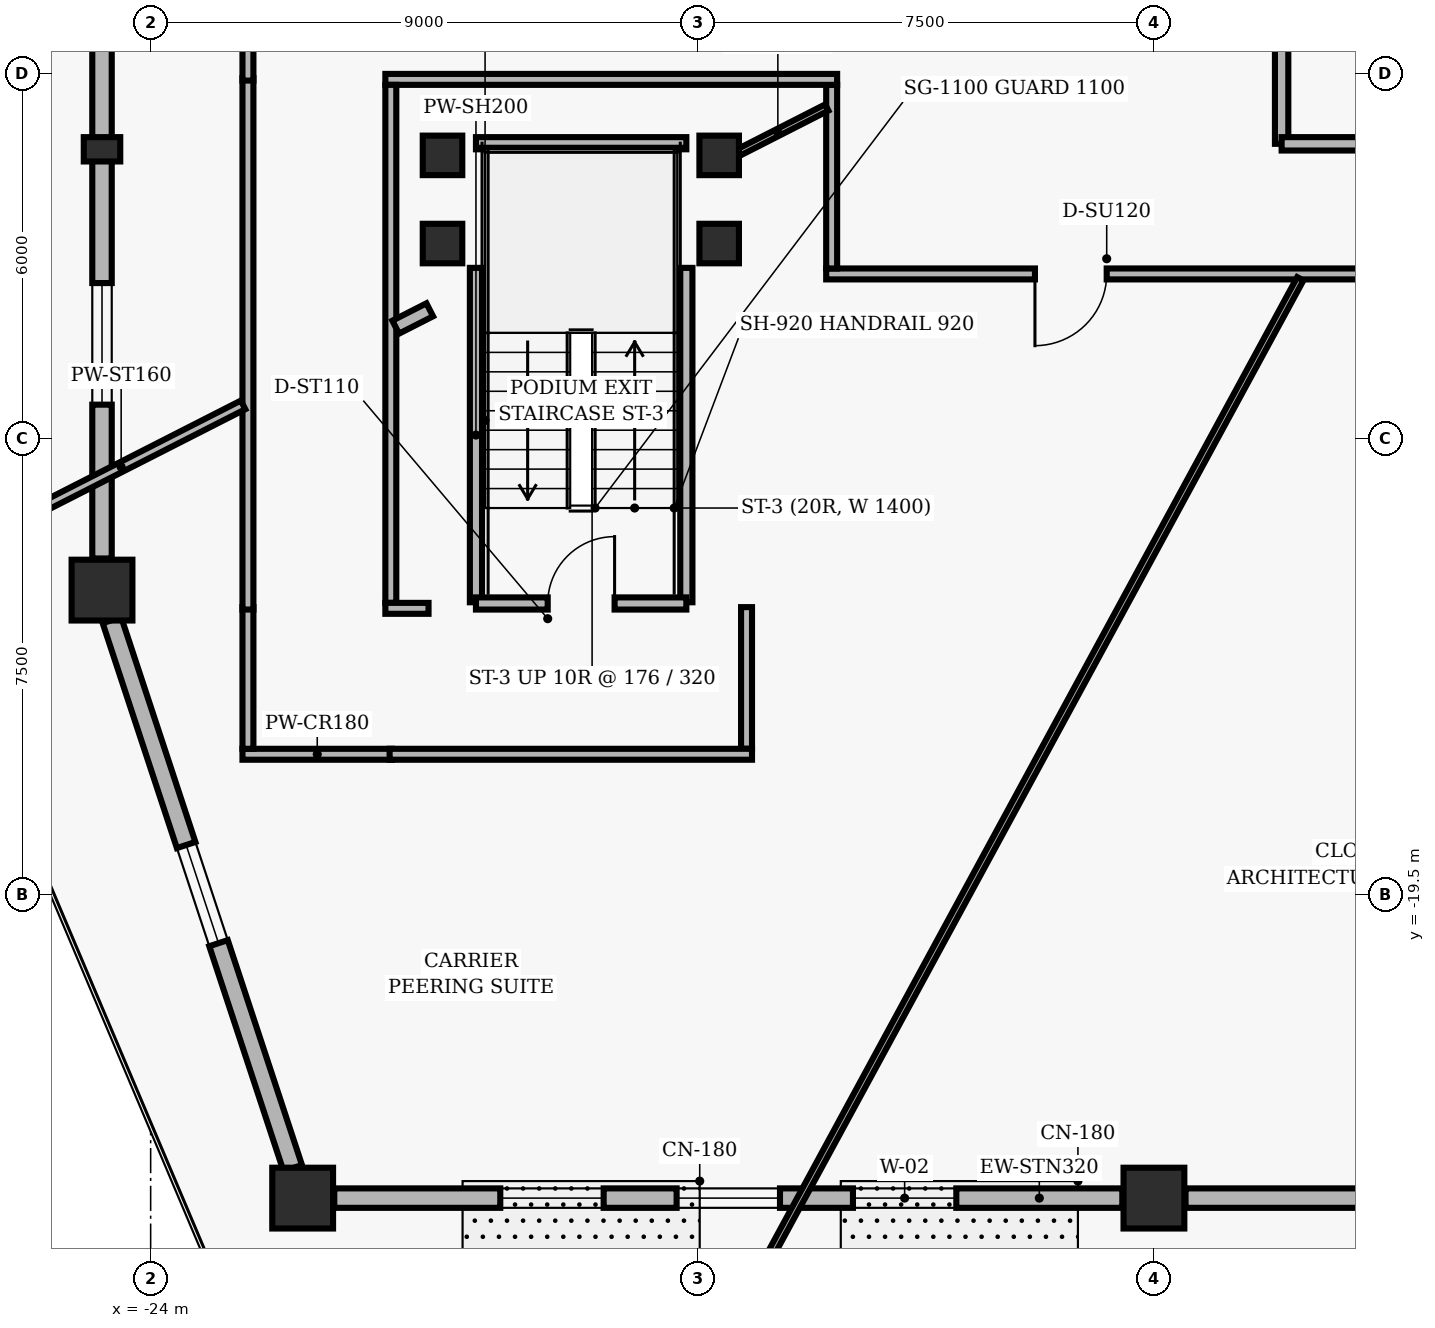
"""IFC4 building model, lengths in metres.
Left out: names, types, materials, properties, quantities, classifications, styles, units other than length and angle.
Written with IfcOpenShell. Run it as: python <this file> out.ifc"""

import sys

from ifc_helpers import new_model, si_unit, direction, frame, frame_2d, origin, origin_2d, place, context, subcontext, project, spatial, rectangle, extrude, element, fill, save


model = new_model("IFC4")
c1 = context("Model", 3, precision=1e-05, world=origin(), true_north=direction((0.0, 1.0)))
c2 = subcontext(c1, "Body", "Model", "MODEL_VIEW")
j1 = project(units=[si_unit("LENGTHUNIT", "METRE"), si_unit("PLANEANGLEUNIT", "RADIAN")], contexts=[c1])
p1 = place(None, origin())
s1 = spatial("IfcSite", under=j1, at=p1, CompositionType="ELEMENT")
p2 = place(p1, origin())
s2 = spatial("IfcBuilding", under=s1, at=p2, CompositionType="ELEMENT")
p3 = place(p2, frame((0.0, 0.0, 4.8)))
s3 = spatial("IfcBuildingStorey", under=s2, at=p3, CompositionType="ELEMENT", Elevation=4.8)
for number, where, z_axis, x_axis in (
    (1, (-21.5, -24.5, 0.0), (0.0, 0.0, 1.0), (1.0, 0.0, 0.0)),
    (2, (-7.5, -24.5, 0.0), (0.0, 0.0, 1.0), (1.0, 0.0, 0.0)),
    (3, (-24.8, -14.5, 0.0), (0.0, 0.0, 1.0), (1.0, 0.0, 0.0)),
):
    element("IfcColumn", number, at=place(p3, frame(where, z_axis=z_axis, x_axis=x_axis)), inside=s3, PredefinedType="COLUMN", context=c2, shape_type="SweptSolid", body=[
        extrude(rectangle(XDim=1.0, YDim=1.0, at=origin_2d()), origin(), (0.0, 0.0, 1.0), 3.52),
    ])
for number, where, z_axis, x_axis in (
    (4, (-19.2, -8.8, 0.0), (0.0, 0.0, 1.0), (1.0, 0.0, 0.0)),
    (5, (-14.65, -8.8, 0.0), (0.0, 0.0, 1.0), (1.0, 0.0, 0.0)),
    (6, (-19.2, -7.35, 0.0), (0.0, 0.0, 1.0), (1.0, 0.0, 0.0)),
    (7, (-14.65, -7.35, 0.0), (0.0, 0.0, 1.0), (1.0, 0.0, 0.0)),
):
    element("IfcColumn", number, at=place(p3, frame(where, z_axis=z_axis, x_axis=x_axis)), inside=s3, PredefinedType="COLUMN", context=c2, shape_type="SweptSolid", body=[
        extrude(rectangle(XDim=0.65, YDim=0.65, at=origin_2d()), origin(), (0.0, 0.0, 1.0), 3.52),
    ])
p4 = place(p3, frame((-24.8, -7.25, 0.0), z_axis=(0.0, 0.0, 1.0), x_axis=(1.0, 0.0, 0.0)))
e8 = element("IfcColumn", 8, at=p4, inside=s3, PredefinedType="PILASTER", context=c2, shape_type="SweptSolid", body=[
    extrude(rectangle(XDim=0.6, YDim=0.4, at=origin_2d()), origin(), (0.0, 0.0, 1.0), 3.52),
])
p5 = place(p3, frame((-8.02, -24.5, 0.0), z_axis=(0.0, 0.0, 1.0), x_axis=(-1.0, 0.0, 0.0)))
e9 = element("IfcWall", 9, at=p5, inside=s3, PredefinedType="SOLIDWALL", context=c2, shape_type="SweptSolid", body=[
    extrude(rectangle(XDim=12.96, YDim=0.32, at=frame_2d((6.48, 0.0))), origin(), (0.0, 0.0, 1.0), 2.588),
])
p6 = place(p5, frame((2.73, 0.0, 0.65)))
e10 = element("IfcOpeningElement", 10, at=p6, cuts=e9, PredefinedType="OPENING", context=c2, shape_type="SweptSolid", body=[
    extrude(rectangle(XDim=1.7, YDim=1.5, at=frame_2d((0.85, 0.75))), frame((0.0, 0.17, 0.0), z_axis=(0.0, -1.0, 0.0), x_axis=(1.0, 0.0, 0.0)), (0.0, 0.0, 1.0), 0.34),
])
p7 = place(p5, frame((5.63, 0.0, 0.65)))
e11 = element("IfcOpeningElement", 11, at=p7, cuts=e9, PredefinedType="OPENING", context=c2, shape_type="SweptSolid", body=[
    extrude(rectangle(XDim=1.7, YDim=1.5, at=frame_2d((0.85, 0.75))), frame((0.0, 0.17, 0.0), z_axis=(0.0, -1.0, 0.0), x_axis=(1.0, 0.0, 0.0)), (0.0, 0.0, 1.0), 0.34),
])
p8 = place(p5, frame((8.53, 0.0, 0.65)))
e12 = element("IfcOpeningElement", 12, at=p8, cuts=e9, PredefinedType="OPENING", context=c2, shape_type="SweptSolid", body=[
    extrude(rectangle(XDim=1.7, YDim=1.5, at=frame_2d((0.85, 0.75))), frame((0.0, 0.17, 0.0), z_axis=(0.0, -1.0, 0.0), x_axis=(1.0, 0.0, 0.0)), (0.0, 0.0, 1.0), 0.34),
])
p9 = place(p3, frame((4.98, -24.5, 0.0), z_axis=(0.0, 0.0, 1.0), x_axis=(-1.0, 0.0, 0.0)))
e13 = element("IfcWall", 13, at=p9, inside=s3, PredefinedType="SOLIDWALL", context=c2, shape_type="SweptSolid", body=[
    extrude(rectangle(XDim=11.96, YDim=0.32, at=frame_2d((5.98, 0.0))), origin(), (0.0, 0.0, 1.0), 2.588),
])
p10 = place(p9, frame((2.98, 0.0, 0.65)))
e14 = element("IfcOpeningElement", 14, at=p10, cuts=e13, PredefinedType="OPENING", context=c2, shape_type="SweptSolid", body=[
    extrude(rectangle(XDim=1.2, YDim=1.6, at=frame_2d((0.6, 0.8))), frame((0.0, 0.17, 0.0), z_axis=(0.0, -1.0, 0.0), x_axis=(1.0, 0.0, 0.0)), (0.0, 0.0, 1.0), 0.34),
])
p11 = place(p9, frame((5.38, 0.0, 0.65)))
e15 = element("IfcOpeningElement", 15, at=p11, cuts=e13, PredefinedType="OPENING", context=c2, shape_type="SweptSolid", body=[
    extrude(rectangle(XDim=1.2, YDim=1.6, at=frame_2d((0.6, 0.8))), frame((0.0, 0.17, 0.0), z_axis=(0.0, -1.0, 0.0), x_axis=(1.0, 0.0, 0.0)), (0.0, 0.0, 1.0), 0.34),
])
p12 = place(p9, frame((7.78, 0.0, 0.65)))
e16 = element("IfcOpeningElement", 16, at=p12, cuts=e13, PredefinedType="OPENING", context=c2, shape_type="SweptSolid", body=[
    extrude(rectangle(XDim=1.2, YDim=1.6, at=frame_2d((0.6, 0.8))), frame((0.0, 0.17, 0.0), z_axis=(0.0, -1.0, 0.0), x_axis=(1.0, 0.0, 0.0)), (0.0, 0.0, 1.0), 0.34),
])
p13 = place(p3, frame((-24.8, -13.98, 0.0), z_axis=(0.0, 0.0, 1.0), x_axis=(0.0, 1.0, 0.0)))
e17 = element("IfcWall", 17, at=p13, inside=s3, PredefinedType="SOLIDWALL", context=c2, shape_type="SweptSolid", body=[
    extrude(rectangle(XDim=13.46, YDim=0.32, at=frame_2d((6.73, 0.0))), origin(), (0.0, 0.0, 1.0), 2.588),
])
p14 = place(p13, frame((2.53, 0.0, 0.65)))
e18 = element("IfcOpeningElement", 18, at=p14, cuts=e17, PredefinedType="OPENING", context=c2, shape_type="SweptSolid", body=[
    extrude(rectangle(XDim=2.0, YDim=1.6, at=frame_2d((1.0, 0.8))), frame((0.0, 0.17, 0.0), z_axis=(0.0, -1.0, 0.0), x_axis=(1.0, 0.0, 0.0)), (0.0, 0.0, 1.0), 0.34),
])
p15 = place(p13, frame((8.93, 0.0, 0.65)))
e19 = element("IfcOpeningElement", 19, at=p15, cuts=e17, PredefinedType="OPENING", context=c2, shape_type="SweptSolid", body=[
    extrude(rectangle(XDim=2.0, YDim=1.6, at=frame_2d((1.0, 0.8))), frame((0.0, 0.17, 0.0), z_axis=(0.0, -1.0, 0.0), x_axis=(1.0, 0.0, 0.0)), (0.0, 0.0, 1.0), 0.34),
])
p16 = place(p3, frame((-21.663, -24.006, 0.0), z_axis=(0.0, 0.0, 1.0), x_axis=(-0.313363070681, 0.949633395544, 0.0)))
e20 = element("IfcWall", 20, at=p16, inside=s3, PredefinedType="SOLIDWALL", context=c2, shape_type="SweptSolid", body=[
    extrude(rectangle(XDim=9.49, YDim=0.32, at=frame_2d((4.745, 0.0))), origin(), (0.0, 0.0, 1.0), 2.588),
])
p17 = place(p16, frame((3.895, 0.0, 0.65)))
e21 = element("IfcOpeningElement", 21, at=p17, cuts=e20, PredefinedType="OPENING", context=c2, shape_type="SweptSolid", body=[
    extrude(rectangle(XDim=1.7, YDim=1.5, at=frame_2d((0.85, 0.75))), frame((0.0, 0.17, 0.0), z_axis=(0.0, -1.0, 0.0), x_axis=(1.0, 0.0, 0.0)), (0.0, 0.0, 1.0), 0.34),
])
p18 = place(p3, frame((-5.4, -7.16, 0.0), z_axis=(0.0, 0.0, 1.0), x_axis=(0.0, 1.0, 0.0)))
e22 = element("IfcWall", 22, at=p18, inside=s3, PredefinedType="PARTITIONING", context=c2, shape_type="SweptSolid", body=[
    extrude(rectangle(XDim=2.71, YDim=0.22, at=frame_2d((1.355, 0.0))), origin(), (0.0, 0.0, 1.0), 3.193),
])
p19 = place(p3, frame((-5.4, -7.16, 0.0), z_axis=(0.0, 0.0, 1.0), x_axis=(1.0, 0.0, 0.0)))
e23 = element("IfcWall", 23, at=p19, inside=s3, PredefinedType="PARTITIONING", context=c2, shape_type="SweptSolid", body=[
    extrude(rectangle(XDim=5.4, YDim=0.22, at=frame_2d((2.7, 0.0))), origin(), (0.0, 0.0, 1.0), 3.193),
])
p20 = place(p19, frame((2.05, 0.0, 0.0)))
e24 = element("IfcOpeningElement", 24, at=p20, cuts=e23, PredefinedType="OPENING", context=c2, shape_type="SweptSolid", body=[
    extrude(rectangle(XDim=1.12, YDim=2.02, at=frame_2d((0.56, 1.01))), frame((0.0, 0.12, 0.0), z_axis=(0.0, -1.0, 0.0), x_axis=(1.0, 0.0, 0.0)), (0.0, 0.0, 1.0), 0.24),
])
for number, where, z_axis, x_axis in (
    (25, (-18.65, -14.7, 0.0), (0.0, 0.0, 1.0), (0.0, 1.0, 0.0)),
    (26, (-15.19, -14.7, 0.0), (0.0, 0.0, 1.0), (0.0, 1.0, 0.0)),
):
    element("IfcWall", number, at=place(p3, frame(where, z_axis=z_axis, x_axis=x_axis)), inside=s3, PredefinedType="PARTITIONING", context=c2, shape_type="SweptSolid", body=[
        extrude(rectangle(XDim=5.5, YDim=0.2, at=frame_2d((2.75, 0.0))), origin(), (0.0, 0.0, 1.0), 3.193),
    ])
p21 = place(p3, frame((-18.65, -7.15, 0.0), z_axis=(0.0, 0.0, 1.0), x_axis=(1.0, 0.0, 0.0)))
e27 = element("IfcWall", 27, at=p21, inside=s3, PredefinedType="PARTITIONING", context=c2, shape_type="SweptSolid", body=[
    extrude(rectangle(XDim=3.46, YDim=0.2, at=frame_2d((1.73, 0.0))), origin(), (0.0, 0.0, 1.0), 1.3),
])
p22 = place(p3, frame((-18.65, -14.72, 0.0), z_axis=(0.0, 0.0, 1.0), x_axis=(1.0, 0.0, 0.0)))
e28 = element("IfcWall", 28, at=p22, inside=s3, PredefinedType="PARTITIONING", context=c2, shape_type="SweptSolid", body=[
    extrude(rectangle(XDim=3.46, YDim=0.2, at=frame_2d((1.73, 0.0))), origin(), (0.0, 0.0, 1.0), 3.193),
])
p23 = place(p22, frame((1.18, 0.0, 0.0)))
e29 = element("IfcOpeningElement", 29, at=p23, cuts=e28, PredefinedType="OPENING", context=c2, shape_type="SweptSolid", body=[
    extrude(rectangle(XDim=1.1, YDim=2.04, at=frame_2d((0.55, 1.02))), frame((0.0, 0.11, 0.0), z_axis=(0.0, -1.0, 0.0), x_axis=(1.0, 0.0, 0.0)), (0.0, 0.0, 1.0), 0.22),
])
p24 = place(p3, frame((-20.03, -17.2, 0.0), z_axis=(0.0, 0.0, 1.0), x_axis=(-1.0, 0.0, 0.0)))
e30 = element("IfcWall", 30, at=p24, inside=s3, PredefinedType="PARTITIONING", context=c2, shape_type="SweptSolid", body=[
    extrude(rectangle(XDim=2.46, YDim=0.18, at=frame_2d((1.23, 0.0))), origin(), (0.0, 0.0, 1.0), 3.193),
])
p25 = place(p3, frame((-22.4, -17.11, 0.0), z_axis=(0.0, 0.0, 1.0), x_axis=(0.0, 1.0, 0.0)))
e31 = element("IfcWall", 31, at=p25, inside=s3, PredefinedType="PARTITIONING", context=c2, shape_type="SweptSolid", body=[
    extrude(rectangle(XDim=2.33, YDim=0.18, at=frame_2d((1.165, 0.0))), origin(), (0.0, 0.0, 1.0), 3.193),
])
p26 = place(p3, frame((-22.4, -14.82, 0.0), z_axis=(0.0, 0.0, 1.0), x_axis=(0.0, 1.0, 0.0)))
e32 = element("IfcWall", 32, at=p26, inside=s3, PredefinedType="PARTITIONING", context=c2, shape_type="SweptSolid", body=[
    extrude(rectangle(XDim=8.74, YDim=0.18, at=frame_2d((4.37, 0.0))), origin(), (0.0, 0.0, 1.0), 3.193),
])
p27 = place(p3, frame((-22.4, -6.12, 0.0), z_axis=(0.0, 0.0, 1.0), x_axis=(0.0, 1.0, 0.0)))
e33 = element("IfcWall", 33, at=p27, inside=s3, PredefinedType="PARTITIONING", context=c2, shape_type="SweptSolid", body=[
    extrude(rectangle(XDim=2.33, YDim=0.18, at=frame_2d((1.165, 0.0))), origin(), (0.0, 0.0, 1.0), 3.193),
])
p28 = place(p3, frame((12.89, -9.3, 0.0), z_axis=(0.0, 0.0, 1.0), x_axis=(-1.0, 0.0, 0.0)))
e34 = element("IfcWall", 34, at=p28, inside=s3, PredefinedType="PARTITIONING", context=c2, shape_type="SweptSolid", body=[
    extrude(rectangle(XDim=25.78, YDim=0.18, at=frame_2d((12.89, 0.0))), origin(), (0.0, 0.0, 1.0), 2.76),
])
p29 = place(p28, frame((21.167, 0.0, 0.0)))
e35 = element("IfcOpeningElement", 35, at=p29, cuts=e34, PredefinedType="OPENING", context=c2, shape_type="SweptSolid", body=[
    extrude(rectangle(XDim=1.18, YDim=2.02, at=frame_2d((0.59, 1.01))), frame((0.0, 0.1, 0.0), z_axis=(0.0, -1.0, 0.0), x_axis=(1.0, 0.0, 0.0)), (0.0, 0.0, 1.0), 0.2),
])
p30 = place(p28, frame((14.507, 0.0, 0.0)))
e36 = element("IfcOpeningElement", 36, at=p30, cuts=e34, PredefinedType="OPENING", context=c2, shape_type="SweptSolid", body=[
    extrude(rectangle(XDim=0.96, YDim=2.02, at=frame_2d((0.48, 1.01))), frame((0.0, 0.1, 0.0), z_axis=(0.0, -1.0, 0.0), x_axis=(1.0, 0.0, 0.0)), (0.0, 0.0, 1.0), 0.2),
])
p31 = place(p28, frame((8.119, 0.0, 0.0)))
e37 = element("IfcOpeningElement", 37, at=p31, cuts=e34, PredefinedType="OPENING", context=c2, shape_type="SweptSolid", body=[
    extrude(rectangle(XDim=1.02, YDim=2.02, at=frame_2d((0.51, 1.01))), frame((0.0, 0.1, 0.0), z_axis=(0.0, -1.0, 0.0), x_axis=(1.0, 0.0, 0.0)), (0.0, 0.0, 1.0), 0.2),
])
p32 = place(p3, frame((-12.8, -9.21, 0.0), z_axis=(0.0, 0.0, 1.0), x_axis=(0.0, 1.0, 0.0)))
e38 = element("IfcWall", 38, at=p32, inside=s3, PredefinedType="PARTITIONING", context=c2, shape_type="SweptSolid", body=[
    extrude(rectangle(XDim=3.02, YDim=0.18, at=frame_2d((1.51, 0.0))), origin(), (0.0, 0.0, 1.0), 3.193),
])
p33 = place(p3, frame((-12.71, -6.1, 0.0), z_axis=(0.0, 0.0, 1.0), x_axis=(-1.0, 0.0, 0.0)))
e39 = element("IfcWall", 39, at=p33, inside=s3, PredefinedType="PARTITIONING", context=c2, shape_type="SweptSolid", body=[
    extrude(rectangle(XDim=7.43, YDim=0.18, at=frame_2d((3.715, 0.0))), origin(), (0.0, 0.0, 1.0), 3.193),
])
p34 = place(p3, frame((-20.05, -6.19, 0.0), z_axis=(0.0, 0.0, 1.0), x_axis=(0.0, -1.0, 0.0)))
e40 = element("IfcWall", 40, at=p34, inside=s3, PredefinedType="PARTITIONING", context=c2, shape_type="SweptSolid", body=[
    extrude(rectangle(XDim=8.52, YDim=0.18, at=frame_2d((4.26, 0.0))), origin(), (0.0, 0.0, 1.0), 2.246),
])
p35 = place(p3, frame((-20.14, -14.8, 0.0), z_axis=(0.0, 0.0, 1.0), x_axis=(1.0, 0.0, 0.0)))
e41 = element("IfcWall", 41, at=p35, inside=s3, PredefinedType="PARTITIONING", context=c2, shape_type="SweptSolid", body=[
    extrude(rectangle(XDim=0.71, YDim=0.18, at=frame_2d((0.355, 0.0))), origin(), (0.0, 0.0, 1.0), 3.193),
])
p36 = place(p3, frame((-14.2, -14.78, 0.0), z_axis=(0.0, 0.0, 1.0), x_axis=(0.0, -1.0, 0.0)))
e42 = element("IfcWall", 42, at=p36, inside=s3, PredefinedType="PARTITIONING", context=c2, shape_type="SweptSolid", body=[
    extrude(rectangle(XDim=2.33, YDim=0.18, at=frame_2d((1.165, 0.0))), origin(), (0.0, 0.0, 1.0), 3.193),
])
p37 = place(p3, frame((-14.11, -17.2, 0.0), z_axis=(0.0, 0.0, 1.0), x_axis=(-1.0, 0.0, 0.0)))
e43 = element("IfcWall", 43, at=p37, inside=s3, PredefinedType="PARTITIONING", context=c2, shape_type="SweptSolid", body=[
    extrude(rectangle(XDim=5.96, YDim=0.18, at=frame_2d((2.98, 0.0))), origin(), (0.0, 0.0, 1.0), 3.193),
])
p38 = place(p3, frame((-12.88, -6.563, 0.0), z_axis=(0.0, 0.0, 1.0), x_axis=(-0.891024030563, -0.453956139908, 0.0)))
e44 = element("IfcWall", 44, at=p38, inside=s3, PredefinedType="MOVABLE", context=c2, shape_type="SweptSolid", body=[
    extrude(rectangle(XDim=1.807, YDim=0.115, at=frame_2d((0.904, 0.0))), origin(), (0.0, 0.0, 1.0), 3.193),
])
p39 = place(p3, frame((-19.41, -9.89, 0.0), z_axis=(0.0, 0.0, 1.0), x_axis=(-0.890983173506, -0.454036325121, 0.0)))
e45 = element("IfcWall", 45, at=p39, inside=s3, PredefinedType="PARTITIONING", context=c2, shape_type="SweptSolid", body=[
    extrude(rectangle(XDim=0.629, YDim=0.24, at=frame_2d((0.314, 0.0))), origin(), (0.0, 0.0, 1.0), 3.193),
])
p40 = place(p3, frame((-22.48, -11.454, 0.0), z_axis=(0.0, 0.0, 1.0), x_axis=(-0.891005547882, -0.453992415843, 0.0)))
e46 = element("IfcWall", 46, at=p40, inside=s3, PredefinedType="PARTITIONING", context=c2, shape_type="SweptSolid", body=[
    extrude(rectangle(XDim=4.5, YDim=0.16, at=frame_2d((2.25, 0.0))), origin(), (0.0, 0.0, 1.0), 3.193),
])
p41 = place(p3, frame((-5.093, -9.38, 0.0), z_axis=(0.0, 0.0, 1.0), x_axis=(-0.477152799659, -0.878820348978, 0.0)))
e47 = element("IfcWall", 47, at=p41, inside=s3, PredefinedType="MOVABLE", context=c2, shape_type="SweptSolid", body=[
    extrude(rectangle(XDim=19.981, YDim=0.115, at=frame_2d((9.991, 0.0))), origin(), (0.0, 0.0, 1.0), 3.193),
])
p42 = place(p6, origin())
e48 = element("IfcWindow", 48, at=p42, inside=s3, PartitioningType="SINGLE_PANEL", PredefinedType="WINDOW", context=c2, shape_type="SweptSolid", body=[
    extrude(rectangle(XDim=1.7, YDim=1.5, at=frame_2d((0.85, 0.75))), frame((0.0, 0.03, 0.0), z_axis=(0.0, -1.0, 0.0), x_axis=(1.0, 0.0, 0.0)), (0.0, 0.0, 1.0), 0.06),
])
fill(e10, e48)
p43 = place(p7, origin())
e49 = element("IfcWindow", 49, at=p43, inside=s3, PartitioningType="SINGLE_PANEL", PredefinedType="WINDOW", context=c2, shape_type="SweptSolid", body=[
    extrude(rectangle(XDim=1.7, YDim=1.5, at=frame_2d((0.85, 0.75))), frame((0.0, 0.03, 0.0), z_axis=(0.0, -1.0, 0.0), x_axis=(1.0, 0.0, 0.0)), (0.0, 0.0, 1.0), 0.06),
])
fill(e11, e49)
p44 = place(p8, origin())
e50 = element("IfcWindow", 50, at=p44, inside=s3, PartitioningType="SINGLE_PANEL", PredefinedType="WINDOW", context=c2, shape_type="SweptSolid", body=[
    extrude(rectangle(XDim=1.7, YDim=1.5, at=frame_2d((0.85, 0.75))), frame((0.0, 0.03, 0.0), z_axis=(0.0, -1.0, 0.0), x_axis=(1.0, 0.0, 0.0)), (0.0, 0.0, 1.0), 0.06),
])
fill(e12, e50)
p45 = place(p14, origin())
e51 = element("IfcWindow", 51, at=p45, inside=s3, PartitioningType="SINGLE_PANEL", PredefinedType="WINDOW", context=c2, shape_type="SweptSolid", body=[
    extrude(rectangle(XDim=2.0, YDim=1.6, at=frame_2d((1.0, 0.8))), frame((0.0, 0.03, 0.0), z_axis=(0.0, -1.0, 0.0), x_axis=(1.0, 0.0, 0.0)), (0.0, 0.0, 1.0), 0.06),
])
fill(e18, e51)
p46 = place(p17, origin())
e52 = element("IfcWindow", 52, at=p46, inside=s3, PartitioningType="SINGLE_PANEL", PredefinedType="WINDOW", context=c2, shape_type="SweptSolid", body=[
    extrude(rectangle(XDim=1.7, YDim=1.5, at=frame_2d((0.85, 0.75))), frame((0.0, 0.03, 0.0), z_axis=(0.0, -1.0, 0.0), x_axis=(1.0, 0.0, 0.0)), (0.0, 0.0, 1.0), 0.06),
])
fill(e21, e52)
p47 = place(p23, origin())
e53 = element("IfcDoor", 53, at=p47, inside=s3, OperationType="SINGLE_SWING_RIGHT", PredefinedType="DOOR", context=c2, shape_type="SweptSolid", body=[
    extrude(rectangle(XDim=1.1, YDim=2.04, at=frame_2d((0.55, 1.02))), frame((0.0, 0.025, 0.0), z_axis=(0.0, -1.0, 0.0), x_axis=(1.0, 0.0, 0.0)), (0.0, 0.0, 1.0), 0.05),
])
fill(e29, e53)
p48 = place(p29, origin())
e54 = element("IfcDoor", 54, at=p48, inside=s3, OperationType="SINGLE_SWING_RIGHT", PredefinedType="DOOR", context=c2, shape_type="SweptSolid", body=[
    extrude(rectangle(XDim=1.18, YDim=2.02, at=frame_2d((0.59, 1.01))), frame((0.0, 0.025, 0.0), z_axis=(0.0, -1.0, 0.0), x_axis=(1.0, 0.0, 0.0)), (0.0, 0.0, 1.0), 0.05),
])
fill(e35, e54)
save(model, sys.argv[1])
